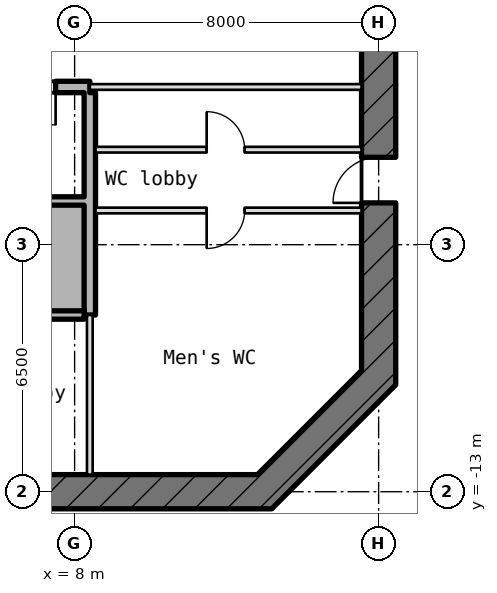
"""IFC4 building model, lengths in metres.
Left out: names, types, materials, properties, quantities, classifications, styles, units other than length and angle.
Written with IfcOpenShell. Run it as: python <this file> out.ifc"""

import sys

from ifc_helpers import new_model, si_unit, direction, frame, frame_2d, origin, place, context, subcontext, project, spatial, rectangle, extrude, element, fill, save


model = new_model("IFC4")
c1 = context("Model", 3, precision=1e-05, world=origin(), true_north=direction((0.0, 1.0)))
c2 = subcontext(c1, "Body", "Model", "MODEL_VIEW")
j1 = project(units=[si_unit("LENGTHUNIT", "METRE"), si_unit("PLANEANGLEUNIT", "RADIAN")], contexts=[c1])
p1 = place(None, origin())
s1 = spatial("IfcSite", under=j1, at=p1, CompositionType="ELEMENT")
p2 = place(p1, origin())
s2 = spatial("IfcBuilding", under=s1, at=p2, CompositionType="ELEMENT")
p3 = place(p2, frame((0.0, 0.0, 210.85)))
s3 = spatial("IfcBuildingStorey", under=s2, at=p3, CompositionType="ELEMENT", Elevation=210.85)
p4 = place(p3, frame((12.868, -13.132, -0.18), z_axis=(0.0, 0.0, 1.0), x_axis=(0.707106781187, 0.707106781187, 0.0)))
e1 = element("IfcWall", 1, at=p4, inside=s3, PredefinedType="SHEAR", context=c2, shape_type="SweptSolid", body=[
    extrude(rectangle(XDim=4.615, YDim=0.9, at=frame_2d((2.308, 0.0))), origin(), (0.0, 0.0, 1.0), 4.15),
])
p5 = place(p3, frame((16.0, -10.186, -0.18), z_axis=(0.0, 0.0, 1.0), x_axis=(0.0, 1.0, 0.0)))
e2 = element("IfcWall", 2, at=p5, inside=s3, PredefinedType="SHEAR", context=c2, shape_type="SweptSolid", body=[
    extrude(rectangle(XDim=20.373, YDim=0.9, at=frame_2d((10.186, 0.0))), origin(), (0.0, 0.0, 1.0), 4.15),
])
p6 = place(p5, frame((8.986, 0.0, 0.18)))
e3 = element("IfcOpeningElement", 3, at=p6, cuts=e2, PredefinedType="OPENING", context=c2, shape_type="SweptSolid", body=[
    extrude(rectangle(XDim=2.4, YDim=2.1, at=frame_2d((1.2, 1.05))), frame((0.0, 0.46, 0.0), z_axis=(0.0, -1.0, 0.0), x_axis=(1.0, 0.0, 0.0)), (0.0, 0.0, 1.0), 0.92),
])
p7 = place(p5, frame((13.586, 0.0, 0.18)))
e4 = element("IfcOpeningElement", 4, at=p7, cuts=e2, PredefinedType="OPENING", context=c2, shape_type="SweptSolid", body=[
    extrude(rectangle(XDim=1.2, YDim=2.1, at=frame_2d((0.6, 1.05))), frame((0.0, 0.46, 0.0), z_axis=(0.0, -1.0, 0.0), x_axis=(1.0, 0.0, 0.0)), (0.0, 0.0, 1.0), 0.92),
])
p8 = place(p5, frame((4.786, 0.0, 0.18)))
e5 = element("IfcOpeningElement", 5, at=p8, cuts=e2, PredefinedType="OPENING", context=c2, shape_type="SweptSolid", body=[
    extrude(rectangle(XDim=1.2, YDim=2.1, at=frame_2d((0.6, 1.05))), frame((0.0, 0.46, 0.0), z_axis=(0.0, -1.0, 0.0), x_axis=(1.0, 0.0, 0.0)), (0.0, 0.0, 1.0), 0.92),
])
p9 = place(p3, frame((-13.186, -13.0, -0.18), z_axis=(0.0, 0.0, 1.0), x_axis=(1.0, 0.0, 0.0)))
e6 = element("IfcWall", 6, at=p9, inside=s3, PredefinedType="SHEAR", context=c2, shape_type="SweptSolid", body=[
    extrude(rectangle(XDim=26.373, YDim=0.9, at=frame_2d((13.186, 0.0))), origin(), (0.0, 0.0, 1.0), 4.15),
])
p10 = place(p9, frame((2.886, 0.0, 0.18)))
e7 = element("IfcOpeningElement", 7, at=p10, cuts=e6, PredefinedType="OPENING", context=c2, shape_type="SweptSolid", body=[
    extrude(rectangle(XDim=1.2, YDim=2.1, at=frame_2d((0.6, 1.05))), frame((0.0, 0.46, 0.0), z_axis=(0.0, -1.0, 0.0), x_axis=(1.0, 0.0, 0.0)), (0.0, 0.0, 1.0), 0.92),
])
p11 = place(p9, frame((6.886, 0.0, 0.18)))
e8 = element("IfcOpeningElement", 8, at=p11, cuts=e6, PredefinedType="OPENING", context=c2, shape_type="SweptSolid", body=[
    extrude(rectangle(XDim=1.4, YDim=2.1, at=frame_2d((0.7, 1.05))), frame((0.0, 0.46, 0.0), z_axis=(0.0, -1.0, 0.0), x_axis=(1.0, 0.0, 0.0)), (0.0, 0.0, 1.0), 0.92),
])
p12 = place(p9, frame((15.486, 0.0, 0.18)))
e9 = element("IfcOpeningElement", 9, at=p12, cuts=e6, PredefinedType="OPENING", context=c2, shape_type="SweptSolid", body=[
    extrude(rectangle(XDim=1.4, YDim=2.1, at=frame_2d((0.7, 1.05))), frame((0.0, 0.46, 0.0), z_axis=(0.0, -1.0, 0.0), x_axis=(1.0, 0.0, 0.0)), (0.0, 0.0, 1.0), 0.92),
])
p13 = place(p3, frame((-2.69, -8.35, 0.0), z_axis=(0.0, 0.0, 1.0), x_axis=(1.0, 0.0, 0.0)))
e10 = element("IfcWall", 10, at=p13, inside=s3, PredefinedType="STANDARD", context=c2, shape_type="SweptSolid", body=[
    extrude(rectangle(XDim=10.94, YDim=0.22, at=frame_2d((5.47, 0.0))), origin(), (0.0, 0.0, 1.0), 3.97),
])
p14 = place(p13, frame((0.74, 0.0, 0.0)))
e11 = element("IfcOpeningElement", 11, at=p14, cuts=e10, PredefinedType="OPENING", context=c2, shape_type="SweptSolid", body=[
    extrude(rectangle(XDim=1.1, YDim=2.1, at=frame_2d((0.55, 1.05))), frame((0.0, 0.12, 0.0), z_axis=(0.0, -1.0, 0.0), x_axis=(1.0, 0.0, 0.0)), (0.0, 0.0, 1.0), 0.24),
])
p15 = place(p13, frame((3.54, 0.0, 0.0)))
e12 = element("IfcOpeningElement", 12, at=p15, cuts=e10, PredefinedType="OPENING", context=c2, shape_type="SweptSolid", body=[
    extrude(rectangle(XDim=1.1, YDim=2.1, at=frame_2d((0.55, 1.05))), frame((0.0, 0.12, 0.0), z_axis=(0.0, -1.0, 0.0), x_axis=(1.0, 0.0, 0.0)), (0.0, 0.0, 1.0), 0.24),
])
p16 = place(p3, frame((8.55, -5.6, 0.0), z_axis=(0.0, 0.0, 1.0), x_axis=(1.0, 0.0, 0.0)))
e13 = element("IfcWall", 13, at=p16, inside=s3, PredefinedType="PARTITIONING", context=c2, shape_type="SweptSolid", body=[
    extrude(rectangle(XDim=7.0, YDim=0.15, at=frame_2d((3.5, 0.0))), origin(), (0.0, 0.0, 1.0), 3.97),
])
p17 = place(p16, frame((2.925, 0.0, 0.0)))
e14 = element("IfcOpeningElement", 14, at=p17, cuts=e13, PredefinedType="OPENING", context=c2, shape_type="SweptSolid", body=[
    extrude(rectangle(XDim=1.0, YDim=2.1, at=frame_2d((0.5, 1.05))), frame((0.0, 0.085, 0.0), z_axis=(0.0, -1.0, 0.0), x_axis=(1.0, 0.0, 0.0)), (0.0, 0.0, 1.0), 0.17),
])
p18 = place(p3, frame((-8.25, -5.35, 0.0), z_axis=(0.0, 0.0, 1.0), x_axis=(1.0, 0.0, 0.0)))
e15 = element("IfcWall", 15, at=p18, inside=s3, PredefinedType="STANDARD", context=c2, shape_type="SweptSolid", body=[
    extrude(rectangle(XDim=16.5, YDim=0.22, at=frame_2d((8.25, 0.0))), origin(), (0.0, 0.0, 1.0), 3.97),
])
p19 = place(p3, frame((8.55, -4.0, 0.0), z_axis=(0.0, 0.0, 1.0), x_axis=(1.0, 0.0, 0.0)))
e16 = element("IfcWall", 16, at=p19, inside=s3, PredefinedType="PARTITIONING", context=c2, shape_type="SweptSolid", body=[
    extrude(rectangle(XDim=7.0, YDim=0.15, at=frame_2d((3.5, 0.0))), origin(), (0.0, 0.0, 1.0), 3.97),
])
p20 = place(p19, frame((2.925, 0.0, 0.0)))
e17 = element("IfcOpeningElement", 17, at=p20, cuts=e16, PredefinedType="OPENING", context=c2, shape_type="SweptSolid", body=[
    extrude(rectangle(XDim=1.0, YDim=2.1, at=frame_2d((0.5, 1.05))), frame((0.0, 0.085, 0.0), z_axis=(0.0, -1.0, 0.0), x_axis=(1.0, 0.0, 0.0)), (0.0, 0.0, 1.0), 0.17),
])
p21 = place(p3, frame((-8.4, -2.35, -0.18), z_axis=(0.0, 0.0, 1.0), x_axis=(1.0, 0.0, 0.0)))
e18 = element("IfcWall", 18, at=p21, inside=s3, PredefinedType="SHEAR", context=c2, shape_type="SweptSolid", body=[
    extrude(rectangle(XDim=16.8, YDim=0.3, at=frame_2d((8.4, 0.0))), origin(), (0.0, 0.0, 1.0), 4.15),
])
p22 = place(p21, frame((0.9, 0.0, 0.18)))
e19 = element("IfcOpeningElement", 19, at=p22, cuts=e18, PredefinedType="OPENING", context=c2, shape_type="SweptSolid", body=[
    extrude(rectangle(XDim=1.0, YDim=2.1, at=frame_2d((0.5, 1.05))), frame((0.0, 0.16, 0.0), z_axis=(0.0, -1.0, 0.0), x_axis=(1.0, 0.0, 0.0)), (0.0, 0.0, 1.0), 0.32),
])
p23 = place(p21, frame((6.5, 0.0, 0.18)))
e20 = element("IfcOpeningElement", 20, at=p23, cuts=e18, PredefinedType="OPENING", context=c2, shape_type="SweptSolid", body=[
    extrude(rectangle(XDim=1.0, YDim=2.1, at=frame_2d((0.5, 1.05))), frame((0.0, 0.16, 0.0), z_axis=(0.0, -1.0, 0.0), x_axis=(1.0, 0.0, 0.0)), (0.0, 0.0, 1.0), 0.32),
])
p24 = place(p21, frame((11.82, 0.0, 0.18)))
e21 = element("IfcOpeningElement", 21, at=p24, cuts=e18, PredefinedType="OPENING", context=c2, shape_type="SweptSolid", body=[
    extrude(rectangle(XDim=1.0, YDim=2.1, at=frame_2d((0.5, 1.05))), frame((0.0, 0.16, 0.0), z_axis=(0.0, -1.0, 0.0), x_axis=(1.0, 0.0, 0.0)), (0.0, 0.0, 1.0), 0.32),
])
p25 = place(p21, frame((14.9, 0.0, 0.18)))
e22 = element("IfcOpeningElement", 22, at=p25, cuts=e18, PredefinedType="OPENING", context=c2, shape_type="SweptSolid", body=[
    extrude(rectangle(XDim=1.0, YDim=2.1, at=frame_2d((0.5, 1.05))), frame((0.0, 0.16, 0.0), z_axis=(0.0, -1.0, 0.0), x_axis=(1.0, 0.0, 0.0)), (0.0, 0.0, 1.0), 0.32),
])
p26 = place(p3, frame((8.4, -2.35, 0.0), z_axis=(0.0, 0.0, 1.0), x_axis=(1.0, 0.0, 0.0)))
e23 = element("IfcWall", 23, at=p26, inside=s3, PredefinedType="PARTITIONING", context=c2, shape_type="SweptSolid", body=[
    extrude(rectangle(XDim=7.15, YDim=0.15, at=frame_2d((3.575, 0.0))), origin(), (0.0, 0.0, 1.0), 3.97),
])
p27 = place(p3, frame((8.4, -12.55, 0.0), z_axis=(0.0, 0.0, 1.0), x_axis=(0.0, 1.0, 0.0)))
e24 = element("IfcWall", 24, at=p27, inside=s3, PredefinedType="PARTITIONING", context=c2, shape_type="SweptSolid", body=[
    extrude(rectangle(XDim=4.2, YDim=0.15, at=frame_2d((2.1, 0.0))), origin(), (0.0, 0.0, 1.0), 3.97),
])
p28 = place(p3, frame((8.4, -8.35, -0.18), z_axis=(0.0, 0.0, 1.0), x_axis=(0.0, 1.0, 0.0)))
e25 = element("IfcWall", 25, at=p28, inside=s3, PredefinedType="SHEAR", context=c2, shape_type="SweptSolid", body=[
    extrude(rectangle(XDim=5.85, YDim=0.3, at=frame_2d((2.925, 0.0))), origin(), (0.0, 0.0, 1.0), 4.15),
])
p29 = place(p25, frame((1.0, 0.0, 0.0), z_axis=(0.0, 0.0, 1.0), x_axis=(-1.0, 0.0, 0.0)))
e26 = element("IfcDoor", 26, at=p29, inside=s3, OperationType="SINGLE_SWING_LEFT", PredefinedType="DOOR", context=c2, shape_type="SweptSolid", body=[
    extrude(rectangle(XDim=1.0, YDim=2.1, at=frame_2d((0.5, 1.05))), frame((0.0, 0.025, 0.0), z_axis=(0.0, -1.0, 0.0), x_axis=(1.0, 0.0, 0.0)), (0.0, 0.0, 1.0), 0.05),
])
fill(e22, e26)
p30 = place(p20, origin())
e27 = element("IfcDoor", 27, at=p30, inside=s3, OperationType="SINGLE_SWING_RIGHT", PredefinedType="DOOR", context=c2, shape_type="SweptSolid", body=[
    extrude(rectangle(XDim=1.0, YDim=2.1, at=frame_2d((0.5, 1.05))), frame((0.0, 0.025, 0.0), z_axis=(0.0, -1.0, 0.0), x_axis=(1.0, 0.0, 0.0)), (0.0, 0.0, 1.0), 0.05),
])
fill(e17, e27)
p31 = place(p8, origin())
e28 = element("IfcDoor", 28, at=p31, inside=s3, OperationType="SINGLE_SWING_RIGHT", PredefinedType="DOOR", context=c2, shape_type="SweptSolid", body=[
    extrude(rectangle(XDim=1.2, YDim=2.1, at=frame_2d((0.6, 1.05))), frame((0.0, 0.025, 0.0), z_axis=(0.0, -1.0, 0.0), x_axis=(1.0, 0.0, 0.0)), (0.0, 0.0, 1.0), 0.05),
])
fill(e5, e28)
p32 = place(p17, frame((1.0, 0.0, 0.0), z_axis=(0.0, 0.0, 1.0), x_axis=(-1.0, 0.0, 0.0)))
e29 = element("IfcDoor", 29, at=p32, inside=s3, OperationType="SINGLE_SWING_LEFT", PredefinedType="DOOR", context=c2, shape_type="SweptSolid", body=[
    extrude(rectangle(XDim=1.0, YDim=2.1, at=frame_2d((0.5, 1.05))), frame((0.0, 0.025, 0.0), z_axis=(0.0, -1.0, 0.0), x_axis=(1.0, 0.0, 0.0)), (0.0, 0.0, 1.0), 0.05),
])
fill(e14, e29)
save(model, sys.argv[1])
